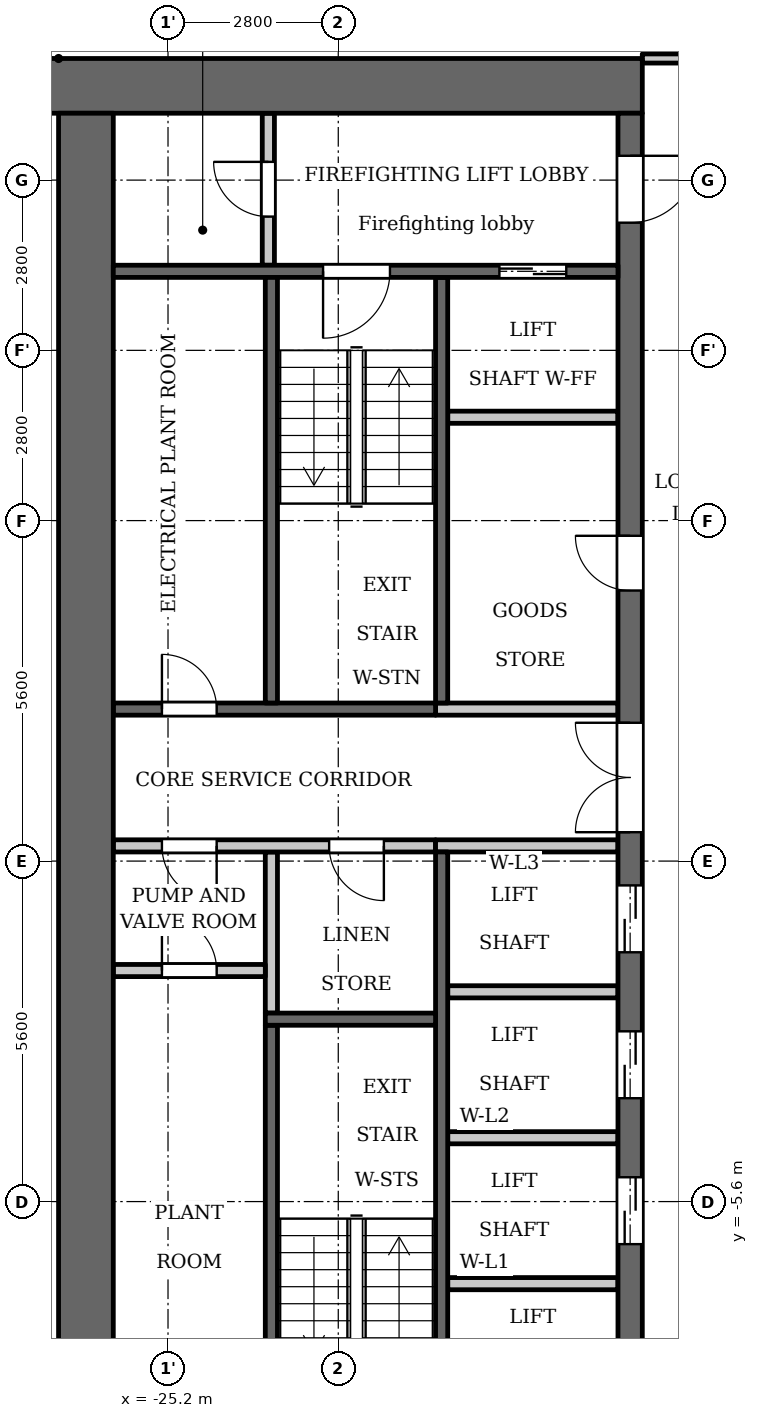
"""IFC4 building model, lengths in metres.
Left out: names, types, materials, properties, quantities, classifications, styles, units other than length and angle.
Written with IfcOpenShell. Run it as: python <this file> out.ifc"""

import sys

from ifc_helpers import new_model, si_unit, direction, frame, frame_2d, origin, place, context, subcontext, project, spatial, rectangle, extrude, element, fill, save


model = new_model("IFC4")
c1 = context("Model", 3, precision=1e-05, world=origin(), true_north=direction((0.0, 1.0)))
c2 = subcontext(c1, "Body", "Model", "MODEL_VIEW")
j1 = project(units=[si_unit("LENGTHUNIT", "METRE"), si_unit("PLANEANGLEUNIT", "RADIAN")], contexts=[c1])
p1 = place(None, origin())
s1 = spatial("IfcSite", under=j1, at=p1, CompositionType="ELEMENT")
p2 = place(p1, origin())
s2 = spatial("IfcBuilding", under=s1, at=p2, CompositionType="ELEMENT")
p3 = place(p2, frame((0.0, 0.0, 34.0)))
s3 = spatial("IfcBuildingStorey", under=s2, at=p3, CompositionType="ELEMENT", Elevation=34.0)
p4 = place(p3, frame((-23.5, -2.5, 0.0), z_axis=(0.0, 0.0, 1.0), x_axis=(0.0, 1.0, 0.0)))
e1 = element("IfcWall", 1, at=p4, inside=s3, PredefinedType="PARTITIONING", context=c2, shape_type="SweptSolid", body=[
    extrude(rectangle(XDim=2.65, YDim=0.2, at=frame_2d((1.325, 0.0))), origin(), (0.0, 0.0, 1.0), 3.2),
])
p5 = place(p3, frame((-20.7, 2.6, 0.0), z_axis=(0.0, 0.0, 1.0), x_axis=(0.0, 1.0, 0.0)))
e2 = element("IfcWall", 2, at=p5, inside=s3, PredefinedType="SHEAR", context=c2, shape_type="SweptSolid", body=[
    extrude(rectangle(XDim=7.0, YDim=0.2, at=frame_2d((3.5, 0.0))), origin(), (0.0, 0.0, 1.0), 3.2),
])
p6 = place(p3, frame((-20.7, -9.6, 0.0), z_axis=(0.0, 0.0, 1.0), x_axis=(0.0, 1.0, 0.0)))
e3 = element("IfcWall", 3, at=p6, inside=s3, PredefinedType="SHEAR", context=c2, shape_type="SweptSolid", body=[
    extrude(rectangle(XDim=9.75, YDim=0.2, at=frame_2d((4.875, 0.0))), origin(), (0.0, 0.0, 1.0), 3.2),
])
p7 = place(p3, frame((-20.8, 2.5, 0.0), z_axis=(0.0, 0.0, 1.0), x_axis=(-1.0, 0.0, 0.0)))
e4 = element("IfcWall", 4, at=p7, inside=s3, PredefinedType="SHEAR", context=c2, shape_type="SweptSolid", body=[
    extrude(rectangle(XDim=5.3, YDim=0.2, at=frame_2d((2.65, 0.0))), origin(), (0.0, 0.0, 1.0), 3.2),
])
p8 = place(p7, frame((3.6, 0.0, 0.0)))
e5 = element("IfcOpeningElement", 5, at=p8, cuts=e4, PredefinedType="OPENING", context=c2, shape_type="SweptSolid", body=[
    extrude(rectangle(XDim=0.9, YDim=2.1, at=frame_2d((0.45, 1.05))), frame((0.0, 0.11, 0.0), z_axis=(0.0, -1.0, 0.0), x_axis=(1.0, 0.0, 0.0)), (0.0, 0.0, 1.0), 0.22),
])
p9 = place(p3, frame((-20.8, 0.25, 0.0), z_axis=(0.0, 0.0, 1.0), x_axis=(-1.0, 0.0, 0.0)))
e6 = element("IfcWall", 6, at=p9, inside=s3, PredefinedType="PARTITIONING", context=c2, shape_type="SweptSolid", body=[
    extrude(rectangle(XDim=5.3, YDim=0.2, at=frame_2d((2.65, 0.0))), origin(), (0.0, 0.0, 1.0), 3.2),
])
p10 = place(p9, frame((0.85, 0.0, 0.0)))
e7 = element("IfcOpeningElement", 7, at=p10, cuts=e6, PredefinedType="OPENING", context=c2, shape_type="SweptSolid", body=[
    extrude(rectangle(XDim=0.9, YDim=2.1, at=frame_2d((0.45, 1.05))), frame((0.0, 0.11, 0.0), z_axis=(0.0, -1.0, 0.0), x_axis=(1.0, 0.0, 0.0)), (0.0, 0.0, 1.0), 0.22),
])
p11 = place(p9, frame((3.6, 0.0, 0.0)))
e8 = element("IfcOpeningElement", 8, at=p11, cuts=e6, PredefinedType="OPENING", context=c2, shape_type="SweptSolid", body=[
    extrude(rectangle(XDim=0.9, YDim=2.1, at=frame_2d((0.45, 1.05))), frame((0.0, 0.11, 0.0), z_axis=(0.0, -1.0, 0.0), x_axis=(1.0, 0.0, 0.0)), (0.0, 0.0, 1.0), 0.22),
])
p12 = place(p3, frame((-17.4, 12.75, 0.0), z_axis=(0.0, 0.0, 1.0), x_axis=(-1.0, 0.0, 0.0)))
e9 = element("IfcWall", 9, at=p12, inside=s3, PredefinedType="SHEAR", context=c2, shape_type="SweptSolid", body=[
    extrude(rectangle(XDim=10.4, YDim=0.9, at=frame_2d((5.2, 0.0))), origin(), (0.0, 0.0, 1.0), 3.2),
])
p13 = place(p3, frame((-17.6, -12.3, 0.0), z_axis=(0.0, 0.0, 1.0), x_axis=(0.0, 1.0, 0.0)))
e10 = element("IfcWall", 10, at=p13, inside=s3, PredefinedType="SHEAR", context=c2, shape_type="SweptSolid", body=[
    extrude(rectangle(XDim=24.6, YDim=0.4, at=frame_2d((12.3, 0.0))), origin(), (0.0, 0.0, 1.0), 3.2),
])
p14 = place(p13, frame((6.0, 0.0, 0.0)))
e11 = element("IfcOpeningElement", 11, at=p14, cuts=e10, PredefinedType="OPENING", context=c2, shape_type="SweptSolid", body=[
    extrude(rectangle(XDim=1.1, YDim=2.1, at=frame_2d((0.55, 1.05))), frame((0.0, 0.21, 0.0), z_axis=(0.0, -1.0, 0.0), x_axis=(1.0, 0.0, 0.0)), (0.0, 0.0, 1.0), 0.42),
])
p15 = place(p13, frame((8.4, 0.0, 0.0)))
e12 = element("IfcOpeningElement", 12, at=p15, cuts=e10, PredefinedType="OPENING", context=c2, shape_type="SweptSolid", body=[
    extrude(rectangle(XDim=1.1, YDim=2.1, at=frame_2d((0.55, 1.05))), frame((0.0, 0.21, 0.0), z_axis=(0.0, -1.0, 0.0), x_axis=(1.0, 0.0, 0.0)), (0.0, 0.0, 1.0), 0.42),
])
p16 = place(p13, frame((10.8, 0.0, 0.0)))
e13 = element("IfcOpeningElement", 13, at=p16, cuts=e10, PredefinedType="OPENING", context=c2, shape_type="SweptSolid", body=[
    extrude(rectangle(XDim=1.1, YDim=2.1, at=frame_2d((0.55, 1.05))), frame((0.0, 0.21, 0.0), z_axis=(0.0, -1.0, 0.0), x_axis=(1.0, 0.0, 0.0)), (0.0, 0.0, 1.0), 0.42),
])
p17 = place(p13, frame((16.75, 0.0, 0.0)))
e14 = element("IfcOpeningElement", 14, at=p17, cuts=e10, PredefinedType="OPENING", context=c2, shape_type="SweptSolid", body=[
    extrude(rectangle(XDim=0.9, YDim=2.1, at=frame_2d((0.45, 1.05))), frame((0.0, 0.21, 0.0), z_axis=(0.0, -1.0, 0.0), x_axis=(1.0, 0.0, 0.0)), (0.0, 0.0, 1.0), 0.42),
])
p18 = place(p13, frame((22.8, 0.0, 0.0)))
e15 = element("IfcOpeningElement", 15, at=p18, cuts=e10, PredefinedType="OPENING", context=c2, shape_type="SweptSolid", body=[
    extrude(rectangle(XDim=1.1, YDim=2.1, at=frame_2d((0.55, 1.05))), frame((0.0, 0.21, 0.0), z_axis=(0.0, -1.0, 0.0), x_axis=(1.0, 0.0, 0.0)), (0.0, 0.0, 1.0), 0.42),
])
p19 = place(p13, frame((0.7, 0.0, 0.0)))
e16 = element("IfcOpeningElement", 16, at=p19, cuts=e10, PredefinedType="OPENING", context=c2, shape_type="SweptSolid", body=[
    extrude(rectangle(XDim=1.1, YDim=2.1, at=frame_2d((0.55, 1.05))), frame((0.0, 0.21, 0.0), z_axis=(0.0, -1.0, 0.0), x_axis=(1.0, 0.0, 0.0)), (0.0, 0.0, 1.0), 0.42),
])
p20 = place(p13, frame((12.775, 0.0, 0.0)))
e17 = element("IfcOpeningElement", 17, at=p20, cuts=e10, PredefinedType="OPENING", context=c2, shape_type="SweptSolid", body=[
    extrude(rectangle(XDim=1.8, YDim=2.1, at=frame_2d((0.9, 1.05))), frame((0.0, 0.21, 0.0), z_axis=(0.0, -1.0, 0.0), x_axis=(1.0, 0.0, 0.0)), (0.0, 0.0, 1.0), 0.42),
])
p21 = place(p3, frame((-26.55, -12.3, 0.0), z_axis=(0.0, 0.0, 1.0), x_axis=(0.0, 1.0, 0.0)))
e18 = element("IfcWall", 18, at=p21, inside=s3, PredefinedType="SHEAR", context=c2, shape_type="SweptSolid", body=[
    extrude(rectangle(XDim=24.6, YDim=0.9, at=frame_2d((12.3, 0.0))), origin(), (0.0, 0.0, 1.0), 3.2),
])
p22 = place(p3, frame((-23.55, 9.8, 0.0), z_axis=(0.0, 0.0, 1.0), x_axis=(0.0, 1.0, 0.0)))
e19 = element("IfcWall", 19, at=p22, inside=s3, PredefinedType="PARTITIONING", context=c2, shape_type="SweptSolid", body=[
    extrude(rectangle(XDim=2.5, YDim=0.2, at=frame_2d((1.25, 0.0))), origin(), (0.0, 0.0, 1.0), 3.2),
])
p23 = place(p22, frame((0.8, 0.0, 0.0)))
e20 = element("IfcOpeningElement", 20, at=p23, cuts=e19, PredefinedType="OPENING", context=c2, shape_type="SweptSolid", body=[
    extrude(rectangle(XDim=0.9, YDim=2.1, at=frame_2d((0.45, 1.05))), frame((0.0, 0.11, 0.0), z_axis=(0.0, -1.0, 0.0), x_axis=(1.0, 0.0, 0.0)), (0.0, 0.0, 1.0), 0.22),
])
p24 = place(p3, frame((-23.6, -1.8, 0.0), z_axis=(0.0, 0.0, 1.0), x_axis=(-1.0, 0.0, 0.0)))
e21 = element("IfcWall", 21, at=p24, inside=s3, PredefinedType="PARTITIONING", context=c2, shape_type="SweptSolid", body=[
    extrude(rectangle(XDim=2.5, YDim=0.2, at=frame_2d((1.25, 0.0))), origin(), (0.0, 0.0, 1.0), 3.2),
])
p25 = place(p24, frame((0.8, 0.0, 0.0)))
e22 = element("IfcOpeningElement", 22, at=p25, cuts=e21, PredefinedType="OPENING", context=c2, shape_type="SweptSolid", body=[
    extrude(rectangle(XDim=0.9, YDim=2.1, at=frame_2d((0.45, 1.05))), frame((0.0, 0.11, 0.0), z_axis=(0.0, -1.0, 0.0), x_axis=(1.0, 0.0, 0.0)), (0.0, 0.0, 1.0), 0.22),
])
for number, where, z_axis, x_axis in (
    (23, (-17.8, -6.95, 0.0), (0.0, 0.0, 1.0), (-1.0, 0.0, 0.0)),
    (24, (-17.8, -4.55, 0.0), (0.0, 0.0, 1.0), (-1.0, 0.0, 0.0)),
    (25, (-17.8, -2.15, 0.0), (0.0, 0.0, 1.0), (-1.0, 0.0, 0.0)),
):
    element("IfcWall", number, at=place(p3, frame(where, z_axis=z_axis, x_axis=x_axis)), inside=s3, PredefinedType="PARTITIONING", context=c2, shape_type="SweptSolid", body=[
        extrude(rectangle(XDim=2.8, YDim=0.2, at=frame_2d((1.4, 0.0))), origin(), (0.0, 0.0, 1.0), 3.2),
    ])
for number, where, z_axis, x_axis in (
    (26, (-17.8, 0.25, 0.0), (0.0, 0.0, 1.0), (-1.0, 0.0, 0.0)),
    (27, (-17.8, 2.5, 0.0), (0.0, 0.0, 1.0), (-1.0, 0.0, 0.0)),
):
    element("IfcWall", number, at=place(p3, frame(where, z_axis=z_axis, x_axis=x_axis)), inside=s3, PredefinedType="PARTITIONING", context=c2, shape_type="SweptSolid", body=[
        extrude(rectangle(XDim=3.0, YDim=0.2, at=frame_2d((1.5, 0.0))), origin(), (0.0, 0.0, 1.0), 3.2),
    ])
p26 = place(p3, frame((-17.8, 7.3, 0.0), z_axis=(0.0, 0.0, 1.0), x_axis=(-1.0, 0.0, 0.0)))
e28 = element("IfcWall", 28, at=p26, inside=s3, PredefinedType="PARTITIONING", context=c2, shape_type="SweptSolid", body=[
    extrude(rectangle(XDim=2.8, YDim=0.2, at=frame_2d((1.4, 0.0))), origin(), (0.0, 0.0, 1.0), 3.2),
])
p27 = place(p3, frame((-17.8, 9.7, 0.0), z_axis=(0.0, 0.0, 1.0), x_axis=(-1.0, 0.0, 0.0)))
e29 = element("IfcWall", 29, at=p27, inside=s3, PredefinedType="SHEAR", context=c2, shape_type="SweptSolid", body=[
    extrude(rectangle(XDim=8.3, YDim=0.2, at=frame_2d((4.15, 0.0))), origin(), (0.0, 0.0, 1.0), 3.2),
])
p28 = place(p27, frame((0.85, 0.0, 0.0)))
e30 = element("IfcOpeningElement", 30, at=p28, cuts=e29, PredefinedType="OPENING", context=c2, shape_type="SweptSolid", body=[
    extrude(rectangle(XDim=1.1, YDim=2.1, at=frame_2d((0.55, 1.05))), frame((0.0, 0.11, 0.0), z_axis=(0.0, -1.0, 0.0), x_axis=(1.0, 0.0, 0.0)), (0.0, 0.0, 1.0), 0.22),
])
p29 = place(p27, frame((3.75, 0.0, 0.0)))
e31 = element("IfcOpeningElement", 31, at=p29, cuts=e29, PredefinedType="OPENING", context=c2, shape_type="SweptSolid", body=[
    extrude(rectangle(XDim=1.1, YDim=2.1, at=frame_2d((0.55, 1.05))), frame((0.0, 0.11, 0.0), z_axis=(0.0, -1.0, 0.0), x_axis=(1.0, 0.0, 0.0)), (0.0, 0.0, 1.0), 0.22),
])
p30 = place(p3, frame((-23.5, 2.6, 0.0), z_axis=(0.0, 0.0, 1.0), x_axis=(0.0, 1.0, 0.0)))
e32 = element("IfcWall", 32, at=p30, inside=s3, PredefinedType="SHEAR", context=c2, shape_type="SweptSolid", body=[
    extrude(rectangle(XDim=7.0, YDim=0.2, at=frame_2d((3.5, 0.0))), origin(), (0.0, 0.0, 1.0), 3.2),
])
p31 = place(p3, frame((-23.5, -9.6, 0.0), z_axis=(0.0, 0.0, 1.0), x_axis=(0.0, 1.0, 0.0)))
e33 = element("IfcWall", 33, at=p31, inside=s3, PredefinedType="SHEAR", context=c2, shape_type="SweptSolid", body=[
    extrude(rectangle(XDim=6.9, YDim=0.2, at=frame_2d((3.45, 0.0))), origin(), (0.0, 0.0, 1.0), 3.2),
])
p32 = place(p3, frame((-20.8, -2.6, 0.0), z_axis=(0.0, 0.0, 1.0), x_axis=(-1.0, 0.0, 0.0)))
e34 = element("IfcWall", 34, at=p32, inside=s3, PredefinedType="SHEAR", context=c2, shape_type="SweptSolid", body=[
    extrude(rectangle(XDim=2.8, YDim=0.2, at=frame_2d((1.4, 0.0))), origin(), (0.0, 0.0, 1.0), 3.2),
])
p33 = place(p3, frame((-17.4, 13.2, 0.0), z_axis=(0.0, 0.0, 1.0), x_axis=(1.0, 0.0, 0.0)))
e35 = element("IfcWall", 35, at=p33, inside=s3, PredefinedType="PARTITIONING", context=c2, shape_type="SweptSolid", body=[
    extrude(rectangle(XDim=34.8, YDim=0.15, at=frame_2d((17.4, 0.0))), origin(), (0.0, 0.0, 1.0), 3.2),
])
p34 = place(p33, frame((0.75, 0.0, 0.0)))
e36 = element("IfcOpeningElement", 36, at=p34, cuts=e35, PredefinedType="OPENING", context=c2, shape_type="SweptSolid", body=[
    extrude(rectangle(XDim=1.0, YDim=2.1, at=frame_2d((0.5, 1.05))), frame((0.0, 0.085, 0.0), z_axis=(0.0, -1.0, 0.0), x_axis=(1.0, 0.0, 0.0)), (0.0, 0.0, 1.0), 0.17),
])
p35 = place(p33, frame((33.15, 0.0, 0.0)))
e37 = element("IfcOpeningElement", 37, at=p35, cuts=e35, PredefinedType="OPENING", context=c2, shape_type="SweptSolid", body=[
    extrude(rectangle(XDim=1.0, YDim=2.1, at=frame_2d((0.5, 1.05))), frame((0.0, 0.085, 0.0), z_axis=(0.0, -1.0, 0.0), x_axis=(1.0, 0.0, 0.0)), (0.0, 0.0, 1.0), 0.17),
])
p36 = place(p33, frame((3.05, 0.0, 0.0)))
e38 = element("IfcOpeningElement", 38, at=p36, cuts=e35, PredefinedType="OPENING", context=c2, shape_type="SweptSolid", body=[
    extrude(rectangle(XDim=1.0, YDim=2.1, at=frame_2d((0.5, 1.05))), frame((0.0, 0.085, 0.0), z_axis=(0.0, -1.0, 0.0), x_axis=(1.0, 0.0, 0.0)), (0.0, 0.0, 1.0), 0.17),
])
p37 = place(p33, frame((10.1, 0.0, 0.0)))
e39 = element("IfcOpeningElement", 39, at=p37, cuts=e35, PredefinedType="OPENING", context=c2, shape_type="SweptSolid", body=[
    extrude(rectangle(XDim=1.0, YDim=2.1, at=frame_2d((0.5, 1.05))), frame((0.0, 0.085, 0.0), z_axis=(0.0, -1.0, 0.0), x_axis=(1.0, 0.0, 0.0)), (0.0, 0.0, 1.0), 0.17),
])
p38 = place(p33, frame((12.45, 0.0, 0.0)))
e40 = element("IfcOpeningElement", 40, at=p38, cuts=e35, PredefinedType="OPENING", context=c2, shape_type="SweptSolid", body=[
    extrude(rectangle(XDim=1.0, YDim=2.1, at=frame_2d((0.5, 1.05))), frame((0.0, 0.085, 0.0), z_axis=(0.0, -1.0, 0.0), x_axis=(1.0, 0.0, 0.0)), (0.0, 0.0, 1.0), 0.17),
])
p39 = place(p33, frame((21.3, 0.0, 0.0)))
e41 = element("IfcOpeningElement", 41, at=p39, cuts=e35, PredefinedType="OPENING", context=c2, shape_type="SweptSolid", body=[
    extrude(rectangle(XDim=1.0, YDim=2.1, at=frame_2d((0.5, 1.05))), frame((0.0, 0.085, 0.0), z_axis=(0.0, -1.0, 0.0), x_axis=(1.0, 0.0, 0.0)), (0.0, 0.0, 1.0), 0.17),
])
p40 = place(p33, frame((23.65, 0.0, 0.0)))
e42 = element("IfcOpeningElement", 42, at=p40, cuts=e35, PredefinedType="OPENING", context=c2, shape_type="SweptSolid", body=[
    extrude(rectangle(XDim=1.0, YDim=2.1, at=frame_2d((0.5, 1.05))), frame((0.0, 0.085, 0.0), z_axis=(0.0, -1.0, 0.0), x_axis=(1.0, 0.0, 0.0)), (0.0, 0.0, 1.0), 0.17),
])
p41 = place(p33, frame((30.75, 0.0, 0.0)))
e43 = element("IfcOpeningElement", 43, at=p41, cuts=e35, PredefinedType="OPENING", context=c2, shape_type="SweptSolid", body=[
    extrude(rectangle(XDim=1.0, YDim=2.1, at=frame_2d((0.5, 1.05))), frame((0.0, 0.085, 0.0), z_axis=(0.0, -1.0, 0.0), x_axis=(1.0, 0.0, 0.0)), (0.0, 0.0, 1.0), 0.17),
])
p42 = place(p14, origin())
e44 = element("IfcDoor", 44, at=p42, inside=s3, OperationType="DOUBLE_DOOR_SLIDING", PredefinedType="DOOR", context=c2, shape_type="SweptSolid", body=[
    extrude(rectangle(XDim=1.1, YDim=2.1, at=frame_2d((0.55, 1.05))), frame((0.0, 0.025, 0.0), z_axis=(0.0, -1.0, 0.0), x_axis=(1.0, 0.0, 0.0)), (0.0, 0.0, 1.0), 0.05),
])
fill(e11, e44)
p43 = place(p15, origin())
e45 = element("IfcDoor", 45, at=p43, inside=s3, OperationType="DOUBLE_DOOR_SLIDING", PredefinedType="DOOR", context=c2, shape_type="SweptSolid", body=[
    extrude(rectangle(XDim=1.1, YDim=2.1, at=frame_2d((0.55, 1.05))), frame((0.0, 0.025, 0.0), z_axis=(0.0, -1.0, 0.0), x_axis=(1.0, 0.0, 0.0)), (0.0, 0.0, 1.0), 0.05),
])
fill(e12, e45)
p44 = place(p16, origin())
e46 = element("IfcDoor", 46, at=p44, inside=s3, OperationType="DOUBLE_DOOR_SLIDING", PredefinedType="DOOR", context=c2, shape_type="SweptSolid", body=[
    extrude(rectangle(XDim=1.1, YDim=2.1, at=frame_2d((0.55, 1.05))), frame((0.0, 0.025, 0.0), z_axis=(0.0, -1.0, 0.0), x_axis=(1.0, 0.0, 0.0)), (0.0, 0.0, 1.0), 0.05),
])
fill(e13, e46)
p45 = place(p17, origin())
e47 = element("IfcDoor", 47, at=p45, inside=s3, OperationType="SINGLE_SWING_LEFT", PredefinedType="DOOR", context=c2, shape_type="SweptSolid", body=[
    extrude(rectangle(XDim=0.9, YDim=2.1, at=frame_2d((0.45, 1.05))), frame((0.0, 0.025, 0.0), z_axis=(0.0, -1.0, 0.0), x_axis=(1.0, 0.0, 0.0)), (0.0, 0.0, 1.0), 0.05),
])
fill(e14, e47)
p46 = place(p28, origin())
e48 = element("IfcDoor", 48, at=p46, inside=s3, OperationType="DOUBLE_DOOR_SLIDING", PredefinedType="DOOR", context=c2, shape_type="SweptSolid", body=[
    extrude(rectangle(XDim=1.1, YDim=2.1, at=frame_2d((0.55, 1.05))), frame((0.0, 0.025, 0.0), z_axis=(0.0, -1.0, 0.0), x_axis=(1.0, 0.0, 0.0)), (0.0, 0.0, 1.0), 0.05),
])
fill(e30, e48)
p47 = place(p18, origin())
e49 = element("IfcDoor", 49, at=p47, inside=s3, OperationType="SINGLE_SWING_RIGHT", PredefinedType="DOOR", context=c2, shape_type="SweptSolid", body=[
    extrude(rectangle(XDim=1.1, YDim=2.1, at=frame_2d((0.55, 1.05))), frame((0.0, 0.025, 0.0), z_axis=(0.0, -1.0, 0.0), x_axis=(1.0, 0.0, 0.0)), (0.0, 0.0, 1.0), 0.05),
])
fill(e15, e49)
p48 = place(p23, origin())
e50 = element("IfcDoor", 50, at=p48, inside=s3, OperationType="SINGLE_SWING_LEFT", PredefinedType="DOOR", context=c2, shape_type="SweptSolid", body=[
    extrude(rectangle(XDim=0.9, YDim=2.1, at=frame_2d((0.45, 1.05))), frame((0.0, 0.025, 0.0), z_axis=(0.0, -1.0, 0.0), x_axis=(1.0, 0.0, 0.0)), (0.0, 0.0, 1.0), 0.05),
])
fill(e20, e50)
p49 = place(p29, origin())
e51 = element("IfcDoor", 51, at=p49, inside=s3, OperationType="SINGLE_SWING_LEFT", PredefinedType="DOOR", context=c2, shape_type="SweptSolid", body=[
    extrude(rectangle(XDim=1.1, YDim=2.1, at=frame_2d((0.55, 1.05))), frame((0.0, 0.025, 0.0), z_axis=(0.0, -1.0, 0.0), x_axis=(1.0, 0.0, 0.0)), (0.0, 0.0, 1.0), 0.05),
])
fill(e31, e51)
p50 = place(p20, origin())
e52 = element("IfcDoor", 52, at=p50, inside=s3, OperationType="DOUBLE_DOOR_SINGLE_SWING", PredefinedType="DOOR", context=c2, shape_type="SweptSolid", body=[
    extrude(rectangle(XDim=1.8, YDim=2.1, at=frame_2d((0.9, 1.05))), frame((0.0, 0.025, 0.0), z_axis=(0.0, -1.0, 0.0), x_axis=(1.0, 0.0, 0.0)), (0.0, 0.0, 1.0), 0.05),
])
fill(e17, e52)
p51 = place(p10, origin())
e53 = element("IfcDoor", 53, at=p51, inside=s3, OperationType="SINGLE_SWING_RIGHT", PredefinedType="DOOR", context=c2, shape_type="SweptSolid", body=[
    extrude(rectangle(XDim=0.9, YDim=2.1, at=frame_2d((0.45, 1.05))), frame((0.0, 0.025, 0.0), z_axis=(0.0, -1.0, 0.0), x_axis=(1.0, 0.0, 0.0)), (0.0, 0.0, 1.0), 0.05),
])
fill(e7, e53)
p52 = place(p25, origin())
e54 = element("IfcDoor", 54, at=p52, inside=s3, OperationType="SINGLE_SWING_RIGHT", PredefinedType="DOOR", context=c2, shape_type="SweptSolid", body=[
    extrude(rectangle(XDim=0.9, YDim=2.1, at=frame_2d((0.45, 1.05))), frame((0.0, 0.025, 0.0), z_axis=(0.0, -1.0, 0.0), x_axis=(1.0, 0.0, 0.0)), (0.0, 0.0, 1.0), 0.05),
])
fill(e22, e54)
p53 = place(p11, origin())
e55 = element("IfcDoor", 55, at=p53, inside=s3, OperationType="SINGLE_SWING_RIGHT", PredefinedType="DOOR", context=c2, shape_type="SweptSolid", body=[
    extrude(rectangle(XDim=0.9, YDim=2.1, at=frame_2d((0.45, 1.05))), frame((0.0, 0.025, 0.0), z_axis=(0.0, -1.0, 0.0), x_axis=(1.0, 0.0, 0.0)), (0.0, 0.0, 1.0), 0.05),
])
fill(e8, e55)
p54 = place(p8, origin())
e56 = element("IfcDoor", 56, at=p54, inside=s3, OperationType="SINGLE_SWING_RIGHT", PredefinedType="DOOR", context=c2, shape_type="SweptSolid", body=[
    extrude(rectangle(XDim=0.9, YDim=2.1, at=frame_2d((0.45, 1.05))), frame((0.0, 0.025, 0.0), z_axis=(0.0, -1.0, 0.0), x_axis=(1.0, 0.0, 0.0)), (0.0, 0.0, 1.0), 0.05),
])
fill(e5, e56)
save(model, sys.argv[1])
